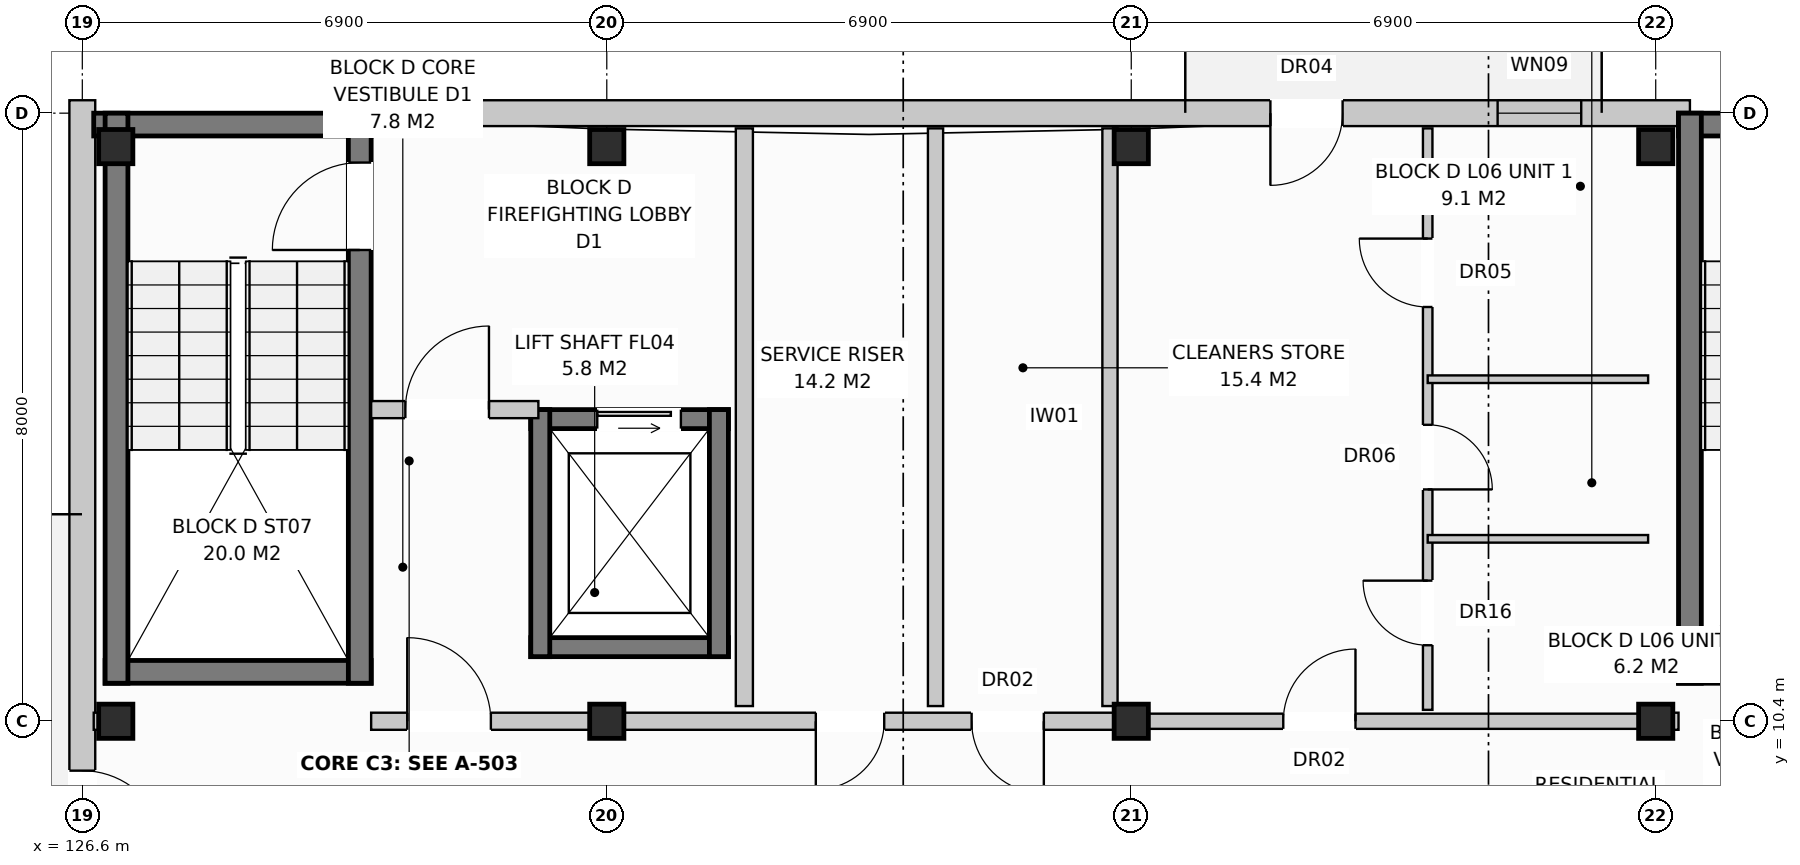
"""IFC4 building model, lengths in metres.
Left out: names, types, materials, properties, quantities, classifications, styles, units other than length and angle.
Written with IfcOpenShell. Run it as: python <this file> out.ifc"""

import sys

from ifc_helpers import new_model, si_unit, direction, frame, frame_2d, origin, origin_with_axes, origin_2d, place, context, subcontext, project, spatial, rectangle, extrude, element, fill, save


model = new_model("IFC4")
c1 = context("Model", 3, precision=1e-05, world=origin(), true_north=direction((0.0, 1.0)))
c2 = subcontext(c1, "Body", "Model", "MODEL_VIEW")
j1 = project(units=[si_unit("LENGTHUNIT", "METRE"), si_unit("PLANEANGLEUNIT", "RADIAN")], contexts=[c1])
p1 = place(None, origin())
s1 = spatial("IfcSite", under=j1, at=p1, CompositionType="ELEMENT")
p2 = place(p1, origin())
s2 = spatial("IfcBuilding", under=s1, at=p2, CompositionType="ELEMENT")
p3 = place(p2, frame((0.0, 0.0, 20.8)))
s3 = spatial("IfcBuildingStorey", under=s2, at=p3, CompositionType="ELEMENT", Elevation=20.8)
for number, where, z_axis, x_axis in (
    (1, (127.04, 10.4, 0.0), (0.0, 0.0, 1.0), (1.0, 0.0, 0.0)),
    (2, (127.04, 17.96, 0.0), (0.0, 0.0, 1.0), (1.0, 0.0, 0.0)),
    (3, (133.5, 10.4, 0.0), (0.0, 0.0, 1.0), (1.0, 0.0, 0.0)),
    (4, (133.5, 17.96, 0.0), (0.0, 0.0, 1.0), (1.0, 0.0, 0.0)),
    (5, (140.4, 10.4, 0.0), (0.0, 0.0, 1.0), (1.0, 0.0, 0.0)),
    (6, (140.4, 17.96, 0.0), (0.0, 0.0, 1.0), (1.0, 0.0, 0.0)),
    (7, (147.3, 10.4, 0.0), (0.0, 0.0, 1.0), (1.0, 0.0, 0.0)),
    (8, (147.3, 17.96, 0.0), (0.0, 0.0, 1.0), (1.0, 0.0, 0.0)),
):
    element("IfcColumn", number, at=place(p3, frame(where, z_axis=z_axis, x_axis=x_axis)), inside=s3, PredefinedType="COLUMN", context=c2, shape_type="SweptSolid", body=[
        extrude(rectangle(XDim=0.45, YDim=0.45, at=origin_2d()), origin(), (0.0, 0.0, 1.0), 3.2),
    ])
p4 = place(p3, frame((130.25, 18.4, 0.0), z_axis=(0.0, 0.0, 1.0), x_axis=(1.0, 0.0, 0.0)))
e9 = element("IfcWall", 9, at=p4, inside=s3, PredefinedType="STANDARD", context=c2, shape_type="SweptSolid", body=[
    extrude(rectangle(XDim=17.5, YDim=0.34, at=frame_2d((8.75, 0.0))), origin(), (0.0, 0.0, 1.0), 2.95),
])
p5 = place(p4, frame((11.981, 0.0, 0.0)))
e10 = element("IfcOpeningElement", 10, at=p5, cuts=e9, PredefinedType="OPENING", context=c2, shape_type="SweptSolid", body=[
    extrude(rectangle(XDim=0.95, YDim=2.1, at=frame_2d((0.475, 1.05))), frame((0.0, 0.182, 0.0), z_axis=(0.0, -1.0, 0.0), x_axis=(1.0, 0.0, 0.0)), (0.0, 0.0, 1.0), 0.364),
])
p6 = place(p4, frame((14.97, 0.0, 0.72)))
e11 = element("IfcOpeningElement", 11, at=p6, cuts=e9, PredefinedType="OPENING", context=c2, shape_type="SweptSolid", body=[
    extrude(rectangle(XDim=1.1, YDim=1.5, at=frame_2d((0.55, 0.75))), frame((0.0, 0.182, 0.0), z_axis=(0.0, -1.0, 0.0), x_axis=(1.0, 0.0, 0.0)), (0.0, 0.0, 1.0), 0.364),
])
p7 = place(p3, frame((126.6, -0.17, 0.0), z_axis=(0.0, 0.0, 1.0), x_axis=(0.0, 1.0, 0.0)))
e12 = element("IfcWall", 12, at=p7, inside=s3, PredefinedType="STANDARD", context=c2, shape_type="SweptSolid", body=[
    extrude(rectangle(XDim=18.74, YDim=0.34, at=frame_2d((9.37, 0.0))), origin(), (0.0, 0.0, 1.0), 2.95),
])
p8 = place(p7, frame((8.82, 0.0, 0.0)))
e13 = element("IfcOpeningElement", 13, at=p8, cuts=e12, PredefinedType="OPENING", context=c2, shape_type="SweptSolid", body=[
    extrude(rectangle(XDim=1.1, YDim=2.1, at=frame_2d((0.55, 1.05))), frame((0.0, 0.182, 0.0), z_axis=(0.0, -1.0, 0.0), x_axis=(1.0, 0.0, 0.0)), (0.0, 0.0, 1.0), 0.364),
])
p9 = place(p7, frame((1.72, 0.0, 0.72)))
e14 = element("IfcOpeningElement", 14, at=p9, cuts=e12, PredefinedType="OPENING", context=c2, shape_type="SweptSolid", body=[
    extrude(rectangle(XDim=1.1, YDim=1.5, at=frame_2d((0.55, 0.75))), frame((0.0, 0.182, 0.0), z_axis=(0.0, -1.0, 0.0), x_axis=(1.0, 0.0, 0.0)), (0.0, 0.0, 1.0), 0.364),
])
p10 = place(p3, frame((126.75, 18.25, 0.0), z_axis=(0.0, 0.0, 1.0), x_axis=(1.0, 0.0, 0.0)))
e15 = element("IfcWall", 15, at=p10, inside=s3, PredefinedType="SHEAR", context=c2, shape_type="SweptSolid", body=[
    extrude(rectangle(XDim=3.65, YDim=0.3, at=frame_2d((1.825, 0.0))), origin(), (0.0, 0.0, 1.0), 2.95),
])
p11 = place(p3, frame((126.9, 11.05, 0.0), z_axis=(0.0, 0.0, 1.0), x_axis=(1.0, 0.0, 0.0)))
e16 = element("IfcWall", 16, at=p11, inside=s3, PredefinedType="SHEAR", context=c2, shape_type="SweptSolid", body=[
    extrude(rectangle(XDim=3.5, YDim=0.3, at=frame_2d((1.75, 0.0))), origin(), (0.0, 0.0, 1.0), 2.95),
])
p12 = place(p3, frame((127.05, 10.9, 0.0), z_axis=(0.0, 0.0, 1.0), x_axis=(0.0, 1.0, 0.0)))
e17 = element("IfcWall", 17, at=p12, inside=s3, PredefinedType="SHEAR", context=c2, shape_type="SweptSolid", body=[
    extrude(rectangle(XDim=7.5, YDim=0.3, at=frame_2d((3.75, 0.0))), origin(), (0.0, 0.0, 1.0), 2.95),
])
p13 = place(p3, frame((130.25, 10.9, 0.0), z_axis=(0.0, 0.0, 1.0), x_axis=(0.0, 1.0, 0.0)))
e18 = element("IfcWall", 18, at=p13, inside=s3, PredefinedType="SHEAR", context=c2, shape_type="SweptSolid", body=[
    extrude(rectangle(XDim=7.5, YDim=0.3, at=frame_2d((3.75, 0.0))), origin(), (0.0, 0.0, 1.0), 2.95),
])
p14 = place(p13, frame((5.7, 0.0, 0.0)))
e19 = element("IfcOpeningElement", 19, at=p14, cuts=e18, PredefinedType="OPENING", context=c2, shape_type="SweptSolid", body=[
    extrude(rectangle(XDim=1.15, YDim=2.15, at=frame_2d((0.575, 1.075))), frame((0.0, 0.162, 0.0), z_axis=(0.0, -1.0, 0.0), x_axis=(1.0, 0.0, 0.0)), (0.0, 0.0, 1.0), 0.324),
])
p15 = place(p3, frame((132.5, 14.375, 0.0), z_axis=(0.0, 0.0, 1.0), x_axis=(1.0, 0.0, 0.0)))
e20 = element("IfcWall", 20, at=p15, inside=s3, PredefinedType="SHEAR", context=c2, shape_type="SweptSolid", body=[
    extrude(rectangle(XDim=2.6, YDim=0.25, at=frame_2d((1.3, 0.0))), origin(), (0.0, 0.0, 1.0), 2.95),
])
p16 = place(p15, frame((0.875, 0.0, 0.0)))
e21 = element("IfcOpeningElement", 21, at=p16, cuts=e20, PredefinedType="OPENING", context=c2, shape_type="SweptSolid", body=[
    extrude(rectangle(XDim=1.1, YDim=2.1, at=frame_2d((0.55, 1.05))), frame((0.0, 0.137, 0.0), z_axis=(0.0, -1.0, 0.0), x_axis=(1.0, 0.0, 0.0)), (0.0, 0.0, 1.0), 0.274),
])
p17 = place(p3, frame((132.5, 11.375, 0.0), z_axis=(0.0, 0.0, 1.0), x_axis=(1.0, 0.0, 0.0)))
e22 = element("IfcWall", 22, at=p17, inside=s3, PredefinedType="SHEAR", context=c2, shape_type="SweptSolid", body=[
    extrude(rectangle(XDim=2.6, YDim=0.25, at=frame_2d((1.3, 0.0))), origin(), (0.0, 0.0, 1.0), 2.95),
])
for number, where, z_axis, x_axis in (
    (23, (132.625, 11.25, 0.0), (0.0, 0.0, 1.0), (0.0, 1.0, 0.0)),
    (24, (134.975, 11.25, 0.0), (0.0, 0.0, 1.0), (0.0, 1.0, 0.0)),
):
    element("IfcWall", number, at=place(p3, frame(where, z_axis=z_axis, x_axis=x_axis)), inside=s3, PredefinedType="SHEAR", context=c2, shape_type="SweptSolid", body=[
        extrude(rectangle(XDim=3.25, YDim=0.25, at=frame_2d((1.625, 0.0))), origin(), (0.0, 0.0, 1.0), 2.95),
    ])
p18 = place(p3, frame((135.31, 10.6, 0.0), z_axis=(0.0, 0.0, 1.0), x_axis=(0.0, 1.0, 0.0)))
e25 = element("IfcWall", 25, at=p18, inside=s3, PredefinedType="PARTITIONING", context=c2, shape_type="SweptSolid", body=[
    extrude(rectangle(XDim=7.6, YDim=0.225, at=frame_2d((3.8, 0.0))), origin(), (0.0, 0.0, 1.0), 2.59),
])
p19 = place(p3, frame((130.4, 14.5, 0.0), z_axis=(0.0, 0.0, 1.0), x_axis=(1.0, 0.0, 0.0)))
e26 = element("IfcWall", 26, at=p19, inside=s3, PredefinedType="PARTITIONING", context=c2, shape_type="SweptSolid", body=[
    extrude(rectangle(XDim=2.2, YDim=0.225, at=frame_2d((1.1, 0.0))), origin(), (0.0, 0.0, 1.0), 2.95),
])
p20 = place(p19, frame((0.45, 0.0, 0.0)))
e27 = element("IfcOpeningElement", 27, at=p20, cuts=e26, PredefinedType="OPENING", context=c2, shape_type="SweptSolid", body=[
    extrude(rectangle(XDim=1.1, YDim=2.15, at=frame_2d((0.55, 1.075))), frame((0.0, 0.125, 0.0), z_axis=(0.0, -1.0, 0.0), x_axis=(1.0, 0.0, 0.0)), (0.0, 0.0, 1.0), 0.249),
])
p21 = place(p3, frame((126.75, 10.4, 0.0), z_axis=(0.0, 0.0, 1.0), x_axis=(1.0, 0.0, 0.0)))
e28 = element("IfcWall", 28, at=p21, inside=s3, PredefinedType="PARTITIONING", context=c2, shape_type="SweptSolid", body=[
    extrude(rectangle(XDim=0.15, YDim=0.225, at=frame_2d((0.075, 0.0))), origin(), (0.0, 0.0, 1.0), 2.95),
])
for number, where, z_axis, x_axis in (
    (29, (137.825, 10.6, 0.0), (0.0, 0.0, 1.0), (0.0, 1.0, 0.0)),
    (30, (140.12, 10.6, 0.0), (0.0, 0.0, 1.0), (0.0, 1.0, 0.0)),
):
    element("IfcWall", number, at=place(p3, frame(where, z_axis=z_axis, x_axis=x_axis)), inside=s3, PredefinedType="PARTITIONING", context=c2, shape_type="SweptSolid", body=[
        extrude(rectangle(XDim=7.6, YDim=0.2, at=frame_2d((3.8, 0.0))), origin(), (0.0, 0.0, 1.0), 2.95),
    ])
p22 = place(p3, frame((130.4, 10.4, 0.0), z_axis=(0.0, 0.0, 1.0), x_axis=(1.0, 0.0, 0.0)))
e31 = element("IfcWall", 31, at=p22, inside=s3, PredefinedType="PARTITIONING", context=c2, shape_type="SweptSolid", body=[
    extrude(rectangle(XDim=10.0, YDim=0.225, at=frame_2d((5.0, 0.0))), origin(), (0.0, 0.0, 1.0), 2.39),
])
p23 = place(p22, frame((0.475, 0.0, 0.0)))
e32 = element("IfcOpeningElement", 32, at=p23, cuts=e31, PredefinedType="OPENING", context=c2, shape_type="SweptSolid", body=[
    extrude(rectangle(XDim=1.1, YDim=2.15, at=frame_2d((0.55, 1.075))), frame((0.0, 0.125, 0.0), z_axis=(0.0, -1.0, 0.0), x_axis=(1.0, 0.0, 0.0)), (0.0, 0.0, 1.0), 0.249),
])
p24 = place(p22, frame((5.85, 0.0, 0.0)))
e33 = element("IfcOpeningElement", 33, at=p24, cuts=e31, PredefinedType="OPENING", context=c2, shape_type="SweptSolid", body=[
    extrude(rectangle(XDim=0.9, YDim=2.1, at=frame_2d((0.45, 1.05))), frame((0.0, 0.125, 0.0), z_axis=(0.0, -1.0, 0.0), x_axis=(1.0, 0.0, 0.0)), (0.0, 0.0, 1.0), 0.249),
])
p25 = place(p22, frame((7.9, 0.0, 0.0)))
e34 = element("IfcOpeningElement", 34, at=p25, cuts=e31, PredefinedType="OPENING", context=c2, shape_type="SweptSolid", body=[
    extrude(rectangle(XDim=0.95, YDim=2.15, at=frame_2d((0.475, 1.075))), frame((0.0, 0.125, 0.0), z_axis=(0.0, -1.0, 0.0), x_axis=(1.0, 0.0, 0.0)), (0.0, 0.0, 1.0), 0.249),
])
for number, where, z_axis, x_axis in (
    (35, (147.6, 18.25, 0.0), (0.0, 0.0, 1.0), (1.0, 0.0, 0.0)),
    (36, (147.6, 11.05, 0.0), (0.0, 0.0, 1.0), (1.0, 0.0, 0.0)),
):
    element("IfcWall", number, at=place(p3, frame(where, z_axis=z_axis, x_axis=x_axis)), inside=s3, PredefinedType="SHEAR", context=c2, shape_type="SweptSolid", body=[
        extrude(rectangle(XDim=3.5, YDim=0.3, at=frame_2d((1.75, 0.0))), origin(), (0.0, 0.0, 1.0), 2.95),
    ])
p26 = place(p3, frame((147.75, 10.9, 0.0), z_axis=(0.0, 0.0, 1.0), x_axis=(0.0, 1.0, 0.0)))
e37 = element("IfcWall", 37, at=p26, inside=s3, PredefinedType="SHEAR", context=c2, shape_type="SweptSolid", body=[
    extrude(rectangle(XDim=7.5, YDim=0.3, at=frame_2d((3.75, 0.0))), origin(), (0.0, 0.0, 1.0), 2.95),
])
p27 = place(p3, frame((147.3, 10.4, 0.0), z_axis=(0.0, 0.0, 1.0), x_axis=(1.0, 0.0, 0.0)))
e38 = element("IfcWall", 38, at=p27, inside=s3, PredefinedType="PARTITIONING", context=c2, shape_type="SweptSolid", body=[
    extrude(rectangle(XDim=0.3, YDim=0.225, at=frame_2d((0.15, 0.0))), origin(), (0.0, 0.0, 1.0), 2.95),
])
p28 = place(p3, frame((140.4, 10.4, 0.0), z_axis=(0.0, 0.0, 1.0), x_axis=(1.0, 0.0, 0.0)))
e39 = element("IfcWall", 39, at=p28, inside=s3, PredefinedType="PARTITIONING", context=c2, shape_type="SweptSolid", body=[
    extrude(rectangle(XDim=6.9, YDim=0.2, at=frame_2d((3.45, 0.0))), origin(), (0.0, 0.0, 1.0), 2.39),
])
p29 = place(p28, frame((2.0, 0.0, 0.0)))
e40 = element("IfcOpeningElement", 40, at=p29, cuts=e39, PredefinedType="OPENING", context=c2, shape_type="SweptSolid", body=[
    extrude(rectangle(XDim=0.95, YDim=2.15, at=frame_2d((0.475, 1.075))), frame((0.0, 0.112, 0.0), z_axis=(0.0, -1.0, 0.0), x_axis=(1.0, 0.0, 0.0)), (0.0, 0.0, 1.0), 0.224),
])
p30 = place(p3, frame((144.3, 10.55, 0.0), z_axis=(0.0, 0.0, 1.0), x_axis=(0.0, 1.0, 0.0)))
e41 = element("IfcWall", 41, at=p30, inside=s3, PredefinedType="PARTITIONING", context=c2, shape_type="SweptSolid", body=[
    extrude(rectangle(XDim=7.65, YDim=0.125, at=frame_2d((3.825, 0.0))), origin(), (0.0, 0.0, 1.0), 2.95),
])
p31 = place(p30, frame((0.85, 0.0, 0.0)))
e42 = element("IfcOpeningElement", 42, at=p31, cuts=e41, PredefinedType="OPENING", context=c2, shape_type="SweptSolid", body=[
    extrude(rectangle(XDim=0.85, YDim=2.1, at=frame_2d((0.425, 1.05))), frame((0.0, 0.074, 0.0), z_axis=(0.0, -1.0, 0.0), x_axis=(1.0, 0.0, 0.0)), (0.0, 0.0, 1.0), 0.149),
])
p32 = place(p30, frame((2.9, 0.0, 0.0)))
e43 = element("IfcOpeningElement", 43, at=p32, cuts=e41, PredefinedType="OPENING", context=c2, shape_type="SweptSolid", body=[
    extrude(rectangle(XDim=0.85, YDim=2.05, at=frame_2d((0.425, 1.025))), frame((0.0, 0.074, 0.0), z_axis=(0.0, -1.0, 0.0), x_axis=(1.0, 0.0, 0.0)), (0.0, 0.0, 1.0), 0.149),
])
p33 = place(p30, frame((5.3, 0.0, 0.0)))
e44 = element("IfcOpeningElement", 44, at=p33, cuts=e41, PredefinedType="OPENING", context=c2, shape_type="SweptSolid", body=[
    extrude(rectangle(XDim=0.9, YDim=2.1, at=frame_2d((0.45, 1.05))), frame((0.0, 0.074, 0.0), z_axis=(0.0, -1.0, 0.0), x_axis=(1.0, 0.0, 0.0)), (0.0, 0.0, 1.0), 0.149),
])
for number, where, z_axis, x_axis in (
    (45, (144.3, 12.8, 0.0), (0.0, 0.0, 1.0), (1.0, 0.0, 0.0)),
    (46, (144.3, 14.9, 0.0), (0.0, 0.0, 1.0), (1.0, 0.0, 0.0)),
):
    element("IfcWall", number, at=place(p3, frame(where, z_axis=z_axis, x_axis=x_axis)), inside=s3, PredefinedType="PARTITIONING", context=c2, shape_type="SweptSolid", body=[
        extrude(rectangle(XDim=2.9, YDim=0.1, at=frame_2d((1.45, 0.0))), origin(), (0.0, 0.0, 1.0), 2.95),
    ])
p34 = place(p5, frame((0.95, 0.0, 0.0), z_axis=(0.0, 0.0, 1.0), x_axis=(-1.0, 0.0, 0.0)))
e47 = element("IfcDoor", 47, at=p34, inside=s3, OperationType="SINGLE_SWING_LEFT", PredefinedType="DOOR", context=c2, shape_type="SweptSolid", body=[
    extrude(rectangle(XDim=0.95, YDim=2.1, at=frame_2d((0.475, 1.05))), frame((0.0, 0.025, 0.0), z_axis=(0.0, -1.0, 0.0), x_axis=(1.0, 0.0, 0.0)), (0.0, 0.0, 1.0), 0.05),
])
fill(e10, e47)
p35 = place(p6, origin_with_axes())
e48 = element("IfcWindow", 48, at=p35, inside=s3, PartitioningType="SINGLE_PANEL", PredefinedType="WINDOW", context=c2, shape_type="SweptSolid", body=[
    extrude(rectangle(XDim=1.1, YDim=1.5, at=frame_2d((0.55, 0.75))), frame((0.0, 0.03, 0.0), z_axis=(0.0, -1.0, 0.0), x_axis=(1.0, 0.0, 0.0)), (0.0, 0.0, 1.0), 0.06),
])
fill(e11, e48)
p36 = place(p8, frame((1.1, 0.0, 0.0), z_axis=(0.0, 0.0, 1.0), x_axis=(-1.0, 0.0, 0.0)))
e49 = element("IfcDoor", 49, at=p36, inside=s3, OperationType="SINGLE_SWING_LEFT", PredefinedType="DOOR", context=c2, shape_type="SweptSolid", body=[
    extrude(rectangle(XDim=1.1, YDim=2.1, at=frame_2d((0.55, 1.05))), frame((0.0, 0.025, 0.0), z_axis=(0.0, -1.0, 0.0), x_axis=(1.0, 0.0, 0.0)), (0.0, 0.0, 1.0), 0.05),
])
fill(e13, e49)
p37 = place(p14, origin_with_axes())
e50 = element("IfcDoor", 50, at=p37, inside=s3, OperationType="SINGLE_SWING_LEFT", PredefinedType="DOOR", context=c2, shape_type="SweptSolid", body=[
    extrude(rectangle(XDim=1.15, YDim=2.15, at=frame_2d((0.575, 1.075))), frame((0.0, 0.025, 0.0), z_axis=(0.0, -1.0, 0.0), x_axis=(1.0, 0.0, 0.0)), (0.0, 0.0, 1.0), 0.05),
])
fill(e19, e50)
p38 = place(p16, origin_with_axes())
e51 = element("IfcDoor", 51, at=p38, inside=s3, OperationType="SLIDING_TO_LEFT", PredefinedType="DOOR", context=c2, shape_type="SweptSolid", body=[
    extrude(rectangle(XDim=1.1, YDim=2.1, at=frame_2d((0.55, 1.05))), frame((0.0, 0.025, 0.0), z_axis=(0.0, -1.0, 0.0), x_axis=(1.0, 0.0, 0.0)), (0.0, 0.0, 1.0), 0.05),
])
fill(e21, e51)
p39 = place(p20, origin_with_axes())
e52 = element("IfcDoor", 52, at=p39, inside=s3, OperationType="SINGLE_SWING_RIGHT", PredefinedType="DOOR", context=c2, shape_type="SweptSolid", body=[
    extrude(rectangle(XDim=1.1, YDim=2.15, at=frame_2d((0.55, 1.075))), frame((0.0, 0.025, 0.0), z_axis=(0.0, -1.0, 0.0), x_axis=(1.0, 0.0, 0.0)), (0.0, 0.0, 1.0), 0.05),
])
fill(e27, e52)
p40 = place(p23, origin_with_axes())
e53 = element("IfcDoor", 53, at=p40, inside=s3, OperationType="SINGLE_SWING_LEFT", PredefinedType="DOOR", context=c2, shape_type="SweptSolid", body=[
    extrude(rectangle(XDim=1.1, YDim=2.15, at=frame_2d((0.55, 1.075))), frame((0.0, 0.025, 0.0), z_axis=(0.0, -1.0, 0.0), x_axis=(1.0, 0.0, 0.0)), (0.0, 0.0, 1.0), 0.05),
])
fill(e32, e53)
p41 = place(p24, frame((0.9, 0.0, 0.0), z_axis=(0.0, 0.0, 1.0), x_axis=(-1.0, 0.0, 0.0)))
e54 = element("IfcDoor", 54, at=p41, inside=s3, OperationType="SINGLE_SWING_LEFT", PredefinedType="DOOR", context=c2, shape_type="SweptSolid", body=[
    extrude(rectangle(XDim=0.9, YDim=2.1, at=frame_2d((0.45, 1.05))), frame((0.0, 0.025, 0.0), z_axis=(0.0, -1.0, 0.0), x_axis=(1.0, 0.0, 0.0)), (0.0, 0.0, 1.0), 0.05),
])
fill(e33, e54)
p42 = place(p25, frame((0.95, 0.0, 0.0), z_axis=(0.0, 0.0, 1.0), x_axis=(-1.0, 0.0, 0.0)))
e55 = element("IfcDoor", 55, at=p42, inside=s3, OperationType="SINGLE_SWING_RIGHT", PredefinedType="DOOR", context=c2, shape_type="SweptSolid", body=[
    extrude(rectangle(XDim=0.95, YDim=2.15, at=frame_2d((0.475, 1.075))), frame((0.0, 0.025, 0.0), z_axis=(0.0, -1.0, 0.0), x_axis=(1.0, 0.0, 0.0)), (0.0, 0.0, 1.0), 0.05),
])
fill(e34, e55)
p43 = place(p29, origin_with_axes())
e56 = element("IfcDoor", 56, at=p43, inside=s3, OperationType="SINGLE_SWING_RIGHT", PredefinedType="DOOR", context=c2, shape_type="SweptSolid", body=[
    extrude(rectangle(XDim=0.95, YDim=2.15, at=frame_2d((0.475, 1.075))), frame((0.0, 0.025, 0.0), z_axis=(0.0, -1.0, 0.0), x_axis=(1.0, 0.0, 0.0)), (0.0, 0.0, 1.0), 0.05),
])
fill(e40, e56)
p44 = place(p31, origin_with_axes())
e57 = element("IfcDoor", 57, at=p44, inside=s3, OperationType="SINGLE_SWING_RIGHT", PredefinedType="DOOR", context=c2, shape_type="SweptSolid", body=[
    extrude(rectangle(XDim=0.85, YDim=2.1, at=frame_2d((0.425, 1.05))), frame((0.0, 0.025, 0.0), z_axis=(0.0, -1.0, 0.0), x_axis=(1.0, 0.0, 0.0)), (0.0, 0.0, 1.0), 0.05),
])
fill(e42, e57)
p45 = place(p32, frame((0.85, 0.0, 0.0), z_axis=(0.0, 0.0, 1.0), x_axis=(-1.0, 0.0, 0.0)))
e58 = element("IfcDoor", 58, at=p45, inside=s3, OperationType="SINGLE_SWING_LEFT", PredefinedType="DOOR", context=c2, shape_type="SweptSolid", body=[
    extrude(rectangle(XDim=0.85, YDim=2.05, at=frame_2d((0.425, 1.025))), frame((0.0, 0.025, 0.0), z_axis=(0.0, -1.0, 0.0), x_axis=(1.0, 0.0, 0.0)), (0.0, 0.0, 1.0), 0.05),
])
fill(e43, e58)
p46 = place(p33, origin_with_axes())
e59 = element("IfcDoor", 59, at=p46, inside=s3, OperationType="SINGLE_SWING_RIGHT", PredefinedType="DOOR", context=c2, shape_type="SweptSolid", body=[
    extrude(rectangle(XDim=0.9, YDim=2.1, at=frame_2d((0.45, 1.05))), frame((0.0, 0.025, 0.0), z_axis=(0.0, -1.0, 0.0), x_axis=(1.0, 0.0, 0.0)), (0.0, 0.0, 1.0), 0.05),
])
fill(e44, e59)
save(model, sys.argv[1])
